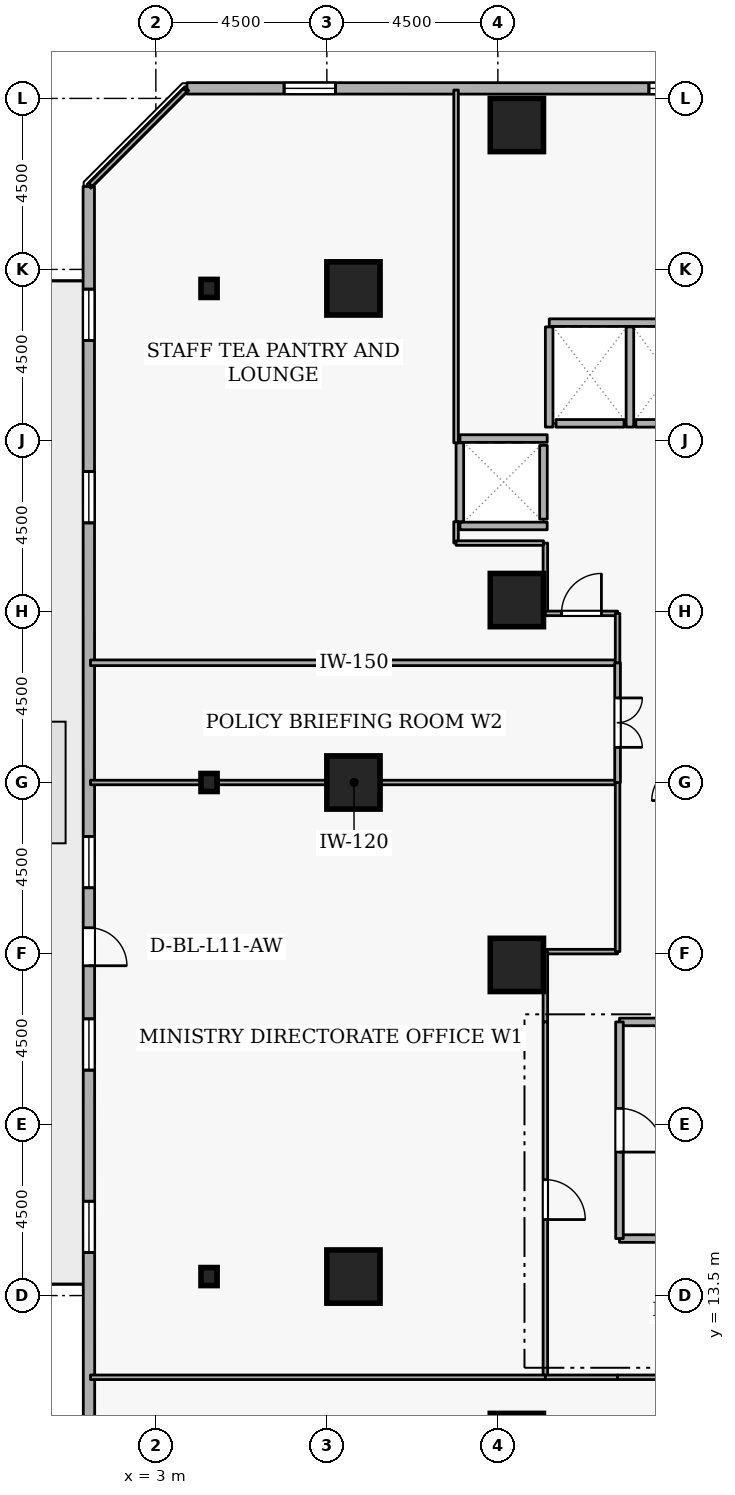
"""IFC4 building model, lengths in metres.
Left out: names, types, materials, properties, quantities, classifications, styles, units other than length and angle.
Written with IfcOpenShell. Run it as: python <this file> out.ifc"""

import sys

from ifc_helpers import new_model, si_unit, direction, frame, frame_2d, origin, origin_2d, place, context, subcontext, project, spatial, rectangle, i_section, extrude, element, fill, save


model = new_model("IFC4")
c1 = context("Model", 3, precision=1e-05, world=origin(), true_north=direction((0.0, 1.0)))
c2 = subcontext(c1, "Body", "Model", "MODEL_VIEW")
j1 = project(units=[si_unit("LENGTHUNIT", "METRE"), si_unit("PLANEANGLEUNIT", "RADIAN")], contexts=[c1])
p1 = place(None, origin())
s1 = spatial("IfcSite", under=j1, at=p1, CompositionType="ELEMENT")
p2 = place(p1, origin())
s2 = spatial("IfcBuilding", under=s1, at=p2, CompositionType="ELEMENT")
p3 = place(p2, frame((0.0, 0.0, 45.9)))
s3 = spatial("IfcBuildingStorey", under=s2, at=p3, CompositionType="ELEMENT", Elevation=45.9)
for number, where, z_axis, x_axis in (
    (1, (12.5, 9.7, 0.0), (0.0, 0.0, 1.0), (1.0, 0.0, 0.0)),
    (2, (12.5, 44.3, 0.0), (0.0, 0.0, 1.0), (1.0, 0.0, 0.0)),
    (3, (8.2, 14.0, 0.0), (0.0, 0.0, 1.0), (1.0, 0.0, 0.0)),
    (4, (8.2, 27.0, 0.0), (0.0, 0.0, 1.0), (1.0, 0.0, 0.0)),
    (5, (8.2, 40.0, 0.0), (0.0, 0.0, 1.0), (1.0, 0.0, 0.0)),
    (6, (12.5, 22.2, 0.0), (0.0, 0.0, 1.0), (1.0, 0.0, 0.0)),
    (7, (12.5, 31.8, 0.0), (0.0, 0.0, 1.0), (1.0, 0.0, 0.0)),
):
    element("IfcColumn", number, at=place(p3, frame(where, z_axis=z_axis, x_axis=x_axis)), inside=s3, PredefinedType="COLUMN", context=c2, shape_type="SweptSolid", body=[
        extrude(rectangle(XDim=1.4, YDim=1.4, at=origin_2d()), origin(), (0.0, 0.0, 1.0), 3.6),
    ])
for number, where, z_axis, x_axis in (
    (8, (4.4, 14.0, 0.0), (0.0, 0.0, 1.0), (1.0, 0.0, 0.0)),
    (9, (4.4, 27.0, 0.0), (0.0, 0.0, 1.0), (1.0, 0.0, 0.0)),
    (10, (4.4, 40.0, 0.0), (0.0, 0.0, 1.0), (1.0, 0.0, 0.0)),
):
    element("IfcColumn", number, at=place(p3, frame(where, z_axis=z_axis, x_axis=x_axis)), inside=s3, PredefinedType="COLUMN", context=c2, shape_type="SweptSolid", body=[
        extrude(i_section(OverallWidth=0.424, OverallDepth=0.475, WebThickness=0.048, FlangeThickness=0.077, FilletRadius=0.015, at=origin_2d()), origin(), (0.0, 0.0, 1.0), 3.6),
    ])
p4 = place(p3, frame((39.225, 45.259, 0.0), z_axis=(0.0, 0.0, 1.0), x_axis=(-0.999999983929, 0.00017928314, 0.0)))
e11 = element("IfcWall", 11, at=p4, inside=s3, PredefinedType="STANDARD", context=c2, shape_type="SweptSolid", body=[
    extrude(rectangle(XDim=35.406, YDim=0.3, at=frame_2d((17.703, 0.0))), origin(), (0.0, 0.0, 1.0), 2.22),
])
p5 = place(p4, frame((7.5, 0.0, 0.72)))
e12 = element("IfcOpeningElement", 12, at=p5, cuts=e11, PredefinedType="OPENING", context=c2, shape_type="SweptSolid", body=[
    extrude(rectangle(XDim=1.35, YDim=1.05, at=frame_2d((0.675, 0.525))), frame((0.0, 0.16, 0.0), z_axis=(0.0, -1.0, 0.0), x_axis=(1.0, 0.0, 0.0)), (0.0, 0.0, 1.0), 0.32),
])
p6 = place(p4, frame((17.1, 0.0, 0.72)))
e13 = element("IfcOpeningElement", 13, at=p6, cuts=e11, PredefinedType="OPENING", context=c2, shape_type="SweptSolid", body=[
    extrude(rectangle(XDim=1.35, YDim=1.05, at=frame_2d((0.675, 0.525))), frame((0.0, 0.16, 0.0), z_axis=(0.0, -1.0, 0.0), x_axis=(1.0, 0.0, 0.0)), (0.0, 0.0, 1.0), 0.32),
])
p7 = place(p4, frame((21.9, 0.0, 0.72)))
e14 = element("IfcOpeningElement", 14, at=p7, cuts=e11, PredefinedType="OPENING", context=c2, shape_type="SweptSolid", body=[
    extrude(rectangle(XDim=1.35, YDim=1.05, at=frame_2d((0.675, 0.525))), frame((0.0, 0.16, 0.0), z_axis=(0.0, -1.0, 0.0), x_axis=(1.0, 0.0, 0.0)), (0.0, 0.0, 1.0), 0.32),
])
p8 = place(p4, frame((31.5, 0.0, 0.72)))
e15 = element("IfcOpeningElement", 15, at=p8, cuts=e11, PredefinedType="OPENING", context=c2, shape_type="SweptSolid", body=[
    extrude(rectangle(XDim=1.35, YDim=1.05, at=frame_2d((0.675, 0.525))), frame((0.0, 0.16, 0.0), z_axis=(0.0, -1.0, 0.0), x_axis=(1.0, 0.0, 0.0)), (0.0, 0.0, 1.0), 0.32),
])
p9 = place(p3, frame((1.235, 42.681, 0.0), z_axis=(0.0, 0.0, 1.0), x_axis=(0.00017928314, -0.999999983929, 0.0)))
e16 = element("IfcWall", 16, at=p9, inside=s3, PredefinedType="STANDARD", context=c2, shape_type="SweptSolid", body=[
    extrude(rectangle(XDim=35.406, YDim=0.3, at=frame_2d((17.703, 0.0))), origin(), (0.0, 0.0, 1.0), 2.22),
])
p10 = place(p9, frame((19.503, 0.0, 0.0)))
e17 = element("IfcOpeningElement", 17, at=p10, cuts=e16, PredefinedType="OPENING", context=c2, shape_type="SweptSolid", body=[
    extrude(rectangle(XDim=1.0, YDim=2.08, at=frame_2d((0.5, 1.04))), frame((0.0, 0.16, 0.0), z_axis=(0.0, -1.0, 0.0), x_axis=(1.0, 0.0, 0.0)), (0.0, 0.0, 1.0), 0.32),
])
p11 = place(p9, frame((2.7, 0.0, 0.72)))
e18 = element("IfcOpeningElement", 18, at=p11, cuts=e16, PredefinedType="OPENING", context=c2, shape_type="SweptSolid", body=[
    extrude(rectangle(XDim=1.35, YDim=1.05, at=frame_2d((0.675, 0.525))), frame((0.0, 0.16, 0.0), z_axis=(0.0, -1.0, 0.0), x_axis=(1.0, 0.0, 0.0)), (0.0, 0.0, 1.0), 0.32),
])
p12 = place(p9, frame((7.5, 0.0, 0.72)))
e19 = element("IfcOpeningElement", 19, at=p12, cuts=e16, PredefinedType="OPENING", context=c2, shape_type="SweptSolid", body=[
    extrude(rectangle(XDim=1.35, YDim=1.05, at=frame_2d((0.675, 0.525))), frame((0.0, 0.16, 0.0), z_axis=(0.0, -1.0, 0.0), x_axis=(1.0, 0.0, 0.0)), (0.0, 0.0, 1.0), 0.32),
])
p13 = place(p9, frame((17.1, 0.0, 0.72)))
e20 = element("IfcOpeningElement", 20, at=p13, cuts=e16, PredefinedType="OPENING", context=c2, shape_type="SweptSolid", body=[
    extrude(rectangle(XDim=1.35, YDim=1.05, at=frame_2d((0.675, 0.525))), frame((0.0, 0.16, 0.0), z_axis=(0.0, -1.0, 0.0), x_axis=(1.0, 0.0, 0.0)), (0.0, 0.0, 1.0), 0.32),
])
p14 = place(p9, frame((21.9, 0.0, 0.72)))
e21 = element("IfcOpeningElement", 21, at=p14, cuts=e16, PredefinedType="OPENING", context=c2, shape_type="SweptSolid", body=[
    extrude(rectangle(XDim=1.35, YDim=1.05, at=frame_2d((0.675, 0.525))), frame((0.0, 0.16, 0.0), z_axis=(0.0, -1.0, 0.0), x_axis=(1.0, 0.0, 0.0)), (0.0, 0.0, 1.0), 0.32),
])
p15 = place(p9, frame((26.7, 0.0, 0.72)))
e22 = element("IfcOpeningElement", 22, at=p15, cuts=e16, PredefinedType="OPENING", context=c2, shape_type="SweptSolid", body=[
    extrude(rectangle(XDim=1.35, YDim=1.05, at=frame_2d((0.675, 0.525))), frame((0.0, 0.16, 0.0), z_axis=(0.0, -1.0, 0.0), x_axis=(1.0, 0.0, 0.0)), (0.0, 0.0, 1.0), 0.32),
])
p16 = place(p3, frame((17.37, 36.45, 0.0), z_axis=(0.0, 0.0, 1.0), x_axis=(-1.0, 0.0, 0.0)))
e23 = element("IfcWall", 23, at=p16, inside=s3, PredefinedType="STANDARD", context=c2, shape_type="SweptSolid", body=[
    extrude(rectangle(XDim=1.74, YDim=0.2, at=frame_2d((0.87, 0.0))), origin(), (0.0, 0.0, 1.0), 3.26),
])
p17 = place(p3, frame((15.32, 36.45, 0.0), z_axis=(0.0, 0.0, 1.0), x_axis=(-1.0, 0.0, 0.0)))
e24 = element("IfcWall", 24, at=p17, inside=s3, PredefinedType="STANDARD", context=c2, shape_type="SweptSolid", body=[
    extrude(rectangle(XDim=1.79, YDim=0.2, at=frame_2d((0.895, 0.0))), origin(), (0.0, 0.0, 1.0), 3.26),
])
p18 = place(p3, frame((13.2, 33.93, 0.0), z_axis=(0.0, 0.0, 1.0), x_axis=(0.0, 1.0, 0.0)))
e25 = element("IfcWall", 25, at=p18, inside=s3, PredefinedType="STANDARD", context=c2, shape_type="SweptSolid", body=[
    extrude(rectangle(XDim=1.94, YDim=0.2, at=frame_2d((0.97, 0.0))), origin(), (0.0, 0.0, 1.0), 3.26),
])
p19 = place(p3, frame((13.352, 39.1, 0.0), z_axis=(0.0, 0.0, 1.0), x_axis=(1.0, 0.0, 0.0)))
e26 = element("IfcWall", 26, at=p19, inside=s3, PredefinedType="STANDARD", context=c2, shape_type="SweptSolid", body=[
    extrude(rectangle(XDim=4.196, YDim=0.2, at=frame_2d((2.098, 0.0))), origin(), (0.0, 0.0, 1.0), 3.26),
])
for number, where, z_axis, x_axis in (
    (27, (15.475, 36.352, 0.0), (0.0, 0.0, 1.0), (0.0, 1.0, 0.0)),
    (28, (13.35, 36.352, 0.0), (0.0, 0.0, 1.0), (0.0, 1.0, 0.0)),
):
    element("IfcWall", number, at=place(p3, frame(where, z_axis=z_axis, x_axis=x_axis)), inside=s3, PredefinedType="STANDARD", context=c2, shape_type="SweptSolid", body=[
        extrude(rectangle(XDim=2.636, YDim=0.2, at=frame_2d((1.318, 0.0))), origin(), (0.0, 0.0, 1.0), 3.26),
    ])
for number, where, z_axis, x_axis in (
    (29, (11.002, 36.05, 0.0), (0.0, 0.0, 1.0), (1.0, 0.0, 0.0)),
    (30, (11.002, 33.75, 0.0), (0.0, 0.0, 1.0), (1.0, 0.0, 0.0)),
):
    element("IfcWall", number, at=place(p3, frame(where, z_axis=z_axis, x_axis=x_axis)), inside=s3, PredefinedType="STANDARD", context=c2, shape_type="SweptSolid", body=[
        extrude(rectangle(XDim=2.296, YDim=0.2, at=frame_2d((1.148, 0.0))), origin(), (0.0, 0.0, 1.0), 3.26),
    ])
p20 = place(p3, frame((11.0, 33.862, 0.0), z_axis=(0.0, 0.0, 1.0), x_axis=(0.0, 1.0, 0.0)))
e31 = element("IfcWall", 31, at=p20, inside=s3, PredefinedType="STANDARD", context=c2, shape_type="SweptSolid", body=[
    extrude(rectangle(XDim=2.076, YDim=0.2, at=frame_2d((1.038, 0.0))), origin(), (0.0, 0.0, 1.0), 3.26),
])
for number, where, z_axis, x_axis in (
    (32, (15.2, 15.0, 0.0), (0.0, 0.0, 1.0), (1.0, 0.0, 0.0)),
    (33, (17.7, 20.7, 0.0), (0.0, 0.0, 1.0), (-1.0, 0.0, 0.0)),
):
    element("IfcWall", number, at=place(p3, frame(where, z_axis=z_axis, x_axis=x_axis)), inside=s3, PredefinedType="STANDARD", context=c2, shape_type="SweptSolid", body=[
        extrude(rectangle(XDim=2.5, YDim=0.2, at=frame_2d((1.25, 0.0))), origin(), (0.0, 0.0, 1.0), 3.26),
    ])
p21 = place(p3, frame((15.2, 20.7, 0.0), z_axis=(0.0, 0.0, 1.0), x_axis=(0.0, -1.0, 0.0)))
e34 = element("IfcWall", 34, at=p21, inside=s3, PredefinedType="STANDARD", context=c2, shape_type="SweptSolid", body=[
    extrude(rectangle(XDim=5.7, YDim=0.2, at=frame_2d((2.85, 0.0))), origin(), (0.0, 0.0, 1.0), 3.26),
])
p22 = place(p21, frame((2.275, 0.0, 0.0)))
e35 = element("IfcOpeningElement", 35, at=p22, cuts=e34, PredefinedType="OPENING", context=c2, shape_type="SweptSolid", body=[
    extrude(rectangle(XDim=1.15, YDim=2.1, at=frame_2d((0.575, 1.05))), frame((0.0, 0.11, 0.0), z_axis=(0.0, -1.0, 0.0), x_axis=(1.0, 0.0, 0.0)), (0.0, 0.0, 1.0), 0.22),
])
p23 = place(p3, frame((15.15, 22.55, 0.0), z_axis=(0.0, 0.0, 1.0), x_axis=(-1.0, 0.0, 0.0)))
e36 = element("IfcWall", 36, at=p23, inside=s3, PredefinedType="PARTITIONING", context=c2, shape_type="SweptSolid", body=[
    extrude(rectangle(XDim=1.9, YDim=0.12, at=frame_2d((0.95, 0.0))), origin(), (0.0, 0.0, 1.0), 3.26),
])
p24 = place(p3, frame((13.25, 22.55, 0.0), z_axis=(0.0, 0.0, 1.0), x_axis=(0.0, -1.0, 0.0)))
e37 = element("IfcWall", 37, at=p24, inside=s3, PredefinedType="PARTITIONING", context=c2, shape_type="SweptSolid", body=[
    extrude(rectangle(XDim=1.85, YDim=0.12, at=frame_2d((0.925, 0.0))), origin(), (0.0, 0.0, 1.0), 3.26),
])
p25 = place(p3, frame((13.25, 20.7, 0.0), z_axis=(0.0, 0.0, 1.0), x_axis=(0.0, -1.0, 0.0)))
e38 = element("IfcWall", 38, at=p25, inside=s3, PredefinedType="PARTITIONING", context=c2, shape_type="SweptSolid", body=[
    extrude(rectangle(XDim=9.35, YDim=0.12, at=frame_2d((4.675, 0.0))), origin(), (0.0, 0.0, 1.0), 3.26),
])
p26 = place(p25, frame((4.15, 0.0, 0.0)))
e39 = element("IfcOpeningElement", 39, at=p26, cuts=e38, PredefinedType="OPENING", context=c2, shape_type="SweptSolid", body=[
    extrude(rectangle(XDim=1.05, YDim=2.1, at=frame_2d((0.525, 1.05))), frame((0.0, 0.07, 0.0), z_axis=(0.0, -1.0, 0.0), x_axis=(1.0, 0.0, 0.0)), (0.0, 0.0, 1.0), 0.14),
])
p27 = place(p3, frame((13.25, 11.35, 0.0), z_axis=(0.0, 0.0, 1.0), x_axis=(-1.0, 0.0, 0.0)))
e40 = element("IfcWall", 40, at=p27, inside=s3, PredefinedType="PARTITIONING", context=c2, shape_type="SweptSolid", body=[
    extrude(rectangle(XDim=11.97, YDim=0.12, at=frame_2d((5.985, 0.0))), origin(), (0.0, 0.0, 1.0), 3.26),
])
p28 = place(p3, frame((1.28, 27.0, 0.0), z_axis=(0.0, 0.0, 1.0), x_axis=(1.0, 0.0, 0.0)))
e41 = element("IfcWall", 41, at=p28, inside=s3, PredefinedType="PARTITIONING", context=c2, shape_type="SweptSolid", body=[
    extrude(rectangle(XDim=13.87, YDim=0.12, at=frame_2d((6.935, 0.0))), origin(), (0.0, 0.0, 1.0), 2.802),
])
p29 = place(p3, frame((15.15, 27.0, 0.0), z_axis=(0.0, 0.0, 1.0), x_axis=(0.0, -1.0, 0.0)))
e42 = element("IfcWall", 42, at=p29, inside=s3, PredefinedType="PARTITIONING", context=c2, shape_type="SweptSolid", body=[
    extrude(rectangle(XDim=4.45, YDim=0.12, at=frame_2d((2.225, 0.0))), origin(), (0.0, 0.0, 1.0), 3.26),
])
p30 = place(p3, frame((1.28, 30.15, 0.0), z_axis=(0.0, 0.0, 1.0), x_axis=(1.0, 0.0, 0.0)))
e43 = element("IfcWall", 43, at=p30, inside=s3, PredefinedType="PARTITIONING", context=c2, shape_type="SweptSolid", body=[
    extrude(rectangle(XDim=13.87, YDim=0.15, at=frame_2d((6.935, 0.0))), origin(), (0.0, 0.0, 1.0), 3.26),
])
p31 = place(p3, frame((15.15, 30.15, 0.0), z_axis=(0.0, 0.0, 1.0), x_axis=(0.0, -1.0, 0.0)))
e44 = element("IfcWall", 44, at=p31, inside=s3, PredefinedType="PARTITIONING", context=c2, shape_type="SweptSolid", body=[
    extrude(rectangle(XDim=3.15, YDim=0.15, at=frame_2d((1.575, 0.0))), origin(), (0.0, 0.0, 1.0), 3.26),
])
p32 = place(p31, frame((0.925, 0.0, 0.0)))
e45 = element("IfcOpeningElement", 45, at=p32, cuts=e44, PredefinedType="OPENING", context=c2, shape_type="SweptSolid", body=[
    extrude(rectangle(XDim=1.3, YDim=2.12, at=frame_2d((0.65, 1.06))), frame((0.0, 0.085, 0.0), z_axis=(0.0, -1.0, 0.0), x_axis=(1.0, 0.0, 0.0)), (0.0, 0.0, 1.0), 0.17),
])
p33 = place(p3, frame((13.25, 33.3, 0.0), z_axis=(0.0, 0.0, 1.0), x_axis=(0.0, -1.0, 0.0)))
e46 = element("IfcWall", 46, at=p33, inside=s3, PredefinedType="PARTITIONING", context=c2, shape_type="SweptSolid", body=[
    extrude(rectangle(XDim=1.85, YDim=0.12, at=frame_2d((0.925, 0.0))), origin(), (0.0, 0.0, 1.0), 3.26),
])
p34 = place(p3, frame((13.25, 31.45, 0.0), z_axis=(0.0, 0.0, 1.0), x_axis=(1.0, 0.0, 0.0)))
e47 = element("IfcWall", 47, at=p34, inside=s3, PredefinedType="PARTITIONING", context=c2, shape_type="SweptSolid", body=[
    extrude(rectangle(XDim=1.9, YDim=0.12, at=frame_2d((0.95, 0.0))), origin(), (0.0, 0.0, 1.0), 3.26),
])
p35 = place(p34, frame((0.425, 0.0, 0.0)))
e48 = element("IfcOpeningElement", 48, at=p35, cuts=e47, PredefinedType="OPENING", context=c2, shape_type="SweptSolid", body=[
    extrude(rectangle(XDim=1.05, YDim=2.1, at=frame_2d((0.525, 1.05))), frame((0.0, 0.07, 0.0), z_axis=(0.0, -1.0, 0.0), x_axis=(1.0, 0.0, 0.0)), (0.0, 0.0, 1.0), 0.14),
])
p36 = place(p3, frame((15.15, 31.45, 0.0), z_axis=(0.0, 0.0, 1.0), x_axis=(0.0, -1.0, 0.0)))
e49 = element("IfcWall", 49, at=p36, inside=s3, PredefinedType="PARTITIONING", context=c2, shape_type="SweptSolid", body=[
    extrude(rectangle(XDim=1.3, YDim=0.12, at=frame_2d((0.65, 0.0))), origin(), (0.0, 0.0, 1.0), 3.26),
])
p37 = place(p3, frame((1.28, 42.725, 0.0), z_axis=(0.0, 0.0, 1.0), x_axis=(0.707106781187, 0.707106781187, 0.0)))
e50 = element("IfcWall", 50, at=p37, inside=s3, PredefinedType="PARTITIONING", context=c2, shape_type="SweptSolid", body=[
    extrude(rectangle(XDim=3.528, YDim=0.12, at=frame_2d((1.764, 0.0))), origin(), (0.0, 0.0, 1.0), 3.26),
])
p38 = place(p3, frame((10.9, 45.22, 0.0), z_axis=(0.0, 0.0, 1.0), x_axis=(0.0, -1.0, 0.0)))
e51 = element("IfcWall", 51, at=p38, inside=s3, PredefinedType="PARTITIONING", context=c2, shape_type="SweptSolid", body=[
    extrude(rectangle(XDim=9.282, YDim=0.12, at=frame_2d((4.641, 0.0))), origin(), (0.0, 0.0, 1.0), 3.26),
])
p39 = place(p3, frame((10.9, 33.862, 0.0), z_axis=(0.0, 0.0, 1.0), x_axis=(0.0, -1.0, 0.0)))
e52 = element("IfcWall", 52, at=p39, inside=s3, PredefinedType="PARTITIONING", context=c2, shape_type="SweptSolid", body=[
    extrude(rectangle(XDim=0.562, YDim=0.12, at=frame_2d((0.281, 0.0))), origin(), (0.0, 0.0, 1.0), 3.26),
])
p40 = place(p3, frame((10.9, 33.3, 0.0), z_axis=(0.0, 0.0, 1.0), x_axis=(1.0, 0.0, 0.0)))
e53 = element("IfcWall", 53, at=p40, inside=s3, PredefinedType="PARTITIONING", context=c2, shape_type="SweptSolid", body=[
    extrude(rectangle(XDim=2.3, YDim=0.12, at=frame_2d((1.15, 0.0))), origin(), (0.0, 0.0, 1.0), 3.26),
])
p41 = place(p3, frame((13.25, 11.35, 0.0), z_axis=(0.0, 0.0, 1.0), x_axis=(1.0, 0.0, 0.0)))
e54 = element("IfcWall", 54, at=p41, inside=s3, PredefinedType="PARTITIONING", context=c2, shape_type="SweptSolid", body=[
    extrude(rectangle(XDim=1.9, YDim=0.12, at=frame_2d((0.95, 0.0))), origin(), (0.0, 0.0, 1.0), 3.26),
])
p42 = place(p3, frame((15.15, 11.35, 0.0), z_axis=(0.0, 0.0, 1.0), x_axis=(1.0, 0.0, 0.0)))
e55 = element("IfcWall", 55, at=p42, inside=s3, PredefinedType="PARTITIONING", context=c2, shape_type="SweptSolid", body=[
    extrude(rectangle(XDim=4.85, YDim=0.12, at=frame_2d((2.425, 0.0))), origin(), (0.0, 0.0, 1.0), 3.26),
])
p43 = place(p42, frame((1.9, 0.0, 0.0)))
e56 = element("IfcOpeningElement", 56, at=p43, cuts=e55, PredefinedType="OPENING", context=c2, shape_type="SweptSolid", body=[
    extrude(rectangle(XDim=1.05, YDim=2.1, at=frame_2d((0.525, 1.05))), frame((0.0, 0.07, 0.0), z_axis=(0.0, -1.0, 0.0), x_axis=(1.0, 0.0, 0.0)), (0.0, 0.0, 1.0), 0.14),
])
p44 = place(p7, origin())
e57 = element("IfcWindow", 57, at=p44, inside=s3, PartitioningType="SINGLE_PANEL", PredefinedType="WINDOW", context=c2, shape_type="SweptSolid", body=[
    extrude(rectangle(XDim=1.35, YDim=1.05, at=frame_2d((0.675, 0.525))), frame((0.0, 0.03, 0.0), z_axis=(0.0, -1.0, 0.0), x_axis=(1.0, 0.0, 0.0)), (0.0, 0.0, 1.0), 0.06),
])
fill(e14, e57)
p45 = place(p8, origin())
e58 = element("IfcWindow", 58, at=p45, inside=s3, PartitioningType="SINGLE_PANEL", PredefinedType="WINDOW", context=c2, shape_type="SweptSolid", body=[
    extrude(rectangle(XDim=1.35, YDim=1.05, at=frame_2d((0.675, 0.525))), frame((0.0, 0.03, 0.0), z_axis=(0.0, -1.0, 0.0), x_axis=(1.0, 0.0, 0.0)), (0.0, 0.0, 1.0), 0.06),
])
fill(e15, e58)
p46 = place(p10, origin())
e59 = element("IfcDoor", 59, at=p46, inside=s3, OperationType="SINGLE_SWING_RIGHT", PredefinedType="DOOR", context=c2, shape_type="SweptSolid", body=[
    extrude(rectangle(XDim=1.0, YDim=2.08, at=frame_2d((0.5, 1.04))), frame((0.0, 0.025, 0.0), z_axis=(0.0, -1.0, 0.0), x_axis=(1.0, 0.0, 0.0)), (0.0, 0.0, 1.0), 0.05),
])
fill(e17, e59)
p47 = place(p11, origin())
e60 = element("IfcWindow", 60, at=p47, inside=s3, PartitioningType="SINGLE_PANEL", PredefinedType="WINDOW", context=c2, shape_type="SweptSolid", body=[
    extrude(rectangle(XDim=1.35, YDim=1.05, at=frame_2d((0.675, 0.525))), frame((0.0, 0.03, 0.0), z_axis=(0.0, -1.0, 0.0), x_axis=(1.0, 0.0, 0.0)), (0.0, 0.0, 1.0), 0.06),
])
fill(e18, e60)
p48 = place(p12, origin())
e61 = element("IfcWindow", 61, at=p48, inside=s3, PartitioningType="SINGLE_PANEL", PredefinedType="WINDOW", context=c2, shape_type="SweptSolid", body=[
    extrude(rectangle(XDim=1.35, YDim=1.05, at=frame_2d((0.675, 0.525))), frame((0.0, 0.03, 0.0), z_axis=(0.0, -1.0, 0.0), x_axis=(1.0, 0.0, 0.0)), (0.0, 0.0, 1.0), 0.06),
])
fill(e19, e61)
p49 = place(p13, origin())
e62 = element("IfcWindow", 62, at=p49, inside=s3, PartitioningType="SINGLE_PANEL", PredefinedType="WINDOW", context=c2, shape_type="SweptSolid", body=[
    extrude(rectangle(XDim=1.35, YDim=1.05, at=frame_2d((0.675, 0.525))), frame((0.0, 0.03, 0.0), z_axis=(0.0, -1.0, 0.0), x_axis=(1.0, 0.0, 0.0)), (0.0, 0.0, 1.0), 0.06),
])
fill(e20, e62)
p50 = place(p14, origin())
e63 = element("IfcWindow", 63, at=p50, inside=s3, PartitioningType="SINGLE_PANEL", PredefinedType="WINDOW", context=c2, shape_type="SweptSolid", body=[
    extrude(rectangle(XDim=1.35, YDim=1.05, at=frame_2d((0.675, 0.525))), frame((0.0, 0.03, 0.0), z_axis=(0.0, -1.0, 0.0), x_axis=(1.0, 0.0, 0.0)), (0.0, 0.0, 1.0), 0.06),
])
fill(e21, e63)
p51 = place(p15, origin())
e64 = element("IfcWindow", 64, at=p51, inside=s3, PartitioningType="SINGLE_PANEL", PredefinedType="WINDOW", context=c2, shape_type="SweptSolid", body=[
    extrude(rectangle(XDim=1.35, YDim=1.05, at=frame_2d((0.675, 0.525))), frame((0.0, 0.03, 0.0), z_axis=(0.0, -1.0, 0.0), x_axis=(1.0, 0.0, 0.0)), (0.0, 0.0, 1.0), 0.06),
])
fill(e22, e64)
p52 = place(p22, origin())
e65 = element("IfcDoor", 65, at=p52, inside=s3, OperationType="SINGLE_SWING_RIGHT", PredefinedType="DOOR", context=c2, shape_type="SweptSolid", body=[
    extrude(rectangle(XDim=1.15, YDim=2.1, at=frame_2d((0.575, 1.05))), frame((0.0, 0.025, 0.0), z_axis=(0.0, -1.0, 0.0), x_axis=(1.0, 0.0, 0.0)), (0.0, 0.0, 1.0), 0.05),
])
fill(e35, e65)
p53 = place(p26, origin())
e66 = element("IfcDoor", 66, at=p53, inside=s3, OperationType="SINGLE_SWING_RIGHT", PredefinedType="DOOR", context=c2, shape_type="SweptSolid", body=[
    extrude(rectangle(XDim=1.05, YDim=2.1, at=frame_2d((0.525, 1.05))), frame((0.0, 0.025, 0.0), z_axis=(0.0, -1.0, 0.0), x_axis=(1.0, 0.0, 0.0)), (0.0, 0.0, 1.0), 0.05),
])
fill(e39, e66)
p54 = place(p32, origin())
e67 = element("IfcDoor", 67, at=p54, inside=s3, OperationType="DOUBLE_DOOR_SINGLE_SWING", PredefinedType="DOOR", context=c2, shape_type="SweptSolid", body=[
    extrude(rectangle(XDim=1.3, YDim=2.12, at=frame_2d((0.65, 1.06))), frame((0.0, 0.025, 0.0), z_axis=(0.0, -1.0, 0.0), x_axis=(1.0, 0.0, 0.0)), (0.0, 0.0, 1.0), 0.05),
])
fill(e45, e67)
p55 = place(p35, origin())
e68 = element("IfcDoor", 68, at=p55, inside=s3, OperationType="SINGLE_SWING_RIGHT", PredefinedType="DOOR", context=c2, shape_type="SweptSolid", body=[
    extrude(rectangle(XDim=1.05, YDim=2.1, at=frame_2d((0.525, 1.05))), frame((0.0, 0.025, 0.0), z_axis=(0.0, -1.0, 0.0), x_axis=(1.0, 0.0, 0.0)), (0.0, 0.0, 1.0), 0.05),
])
fill(e48, e68)
save(model, sys.argv[1])
